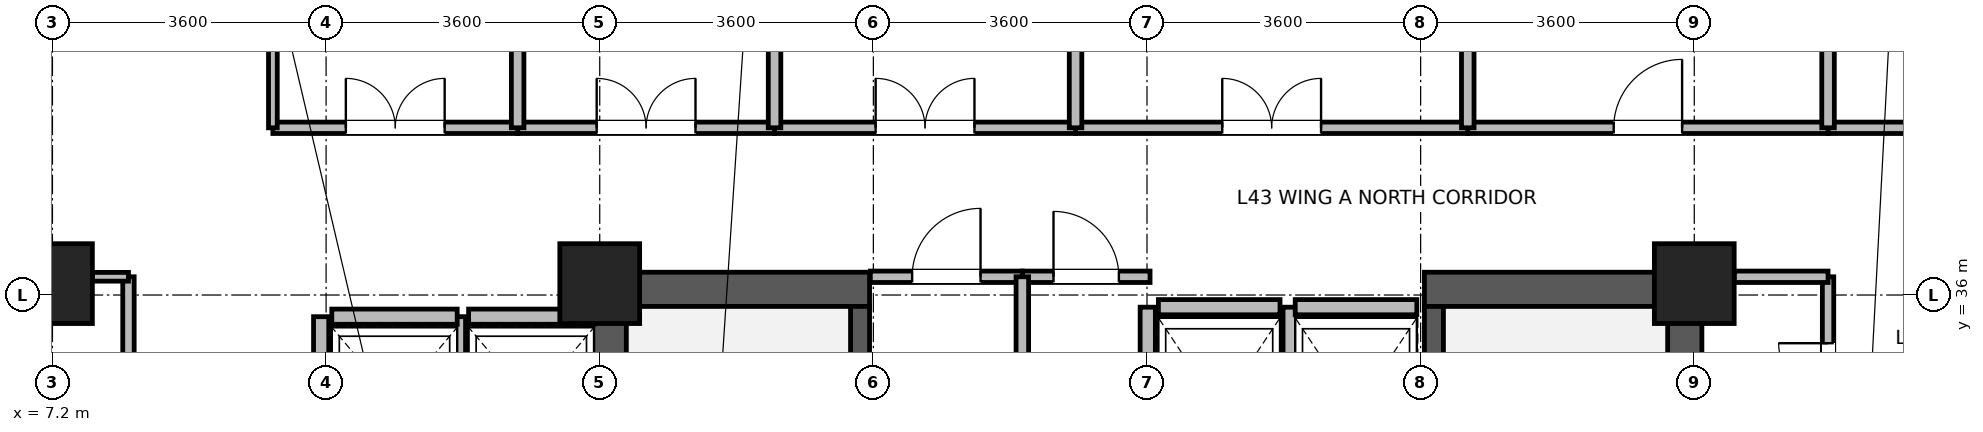
"""IFC4 building model, lengths in metres.
Left out: names, types, materials, properties, quantities, classifications, styles, units other than length and angle.
Written with IfcOpenShell. Run it as: python <this file> out.ifc"""

import sys

from ifc_helpers import new_model, si_unit, direction, frame, frame_2d, origin, origin_2d, place, context, subcontext, project, spatial, rectangle, extrude, source, transform, mapped, element, fill, save


model = new_model("IFC4")
c1 = context("Model", 3, precision=1e-05, world=origin(), true_north=direction((0.0, 1.0)))
c2 = subcontext(c1, "Body", "Model", "MODEL_VIEW")
j1 = project(units=[si_unit("LENGTHUNIT", "METRE"), si_unit("PLANEANGLEUNIT", "RADIAN")], contexts=[c1])
p1 = place(None, origin())
s1 = spatial("IfcSite", under=j1, at=p1, CompositionType="ELEMENT")
p2 = place(p1, origin())
s2 = spatial("IfcBuilding", under=s1, at=p2, CompositionType="ELEMENT")
p3 = place(p2, frame((0.0, 0.0, 169.8)))
s3 = spatial("IfcBuildingStorey", under=s2, at=p3, CompositionType="ELEMENT", Elevation=169.8)
for number, where, z_axis, x_axis in (
    (1, (14.525, 28.4, 0.0), (0.0, 0.0, 1.0), (0.0, 1.0, 0.0)),
    (2, (28.675, 28.4, 0.0), (0.0, 0.0, 1.0), (0.0, 1.0, 0.0)),
):
    element("IfcWall", number, at=place(p3, frame(where, z_axis=z_axis, x_axis=x_axis)), inside=s3, PredefinedType="SHEAR", context=c2, shape_type="SweptSolid", body=[
        extrude(rectangle(XDim=7.9, YDim=0.45, at=frame_2d((3.95, 0.0))), origin(), (0.0, 0.0, 1.0), 3.46),
    ])
for number, where, z_axis, x_axis in (
    (3, (14.75, 36.075, 0.0), (0.0, 0.0, 1.0), (1.0, 0.0, 0.0)),
    (4, (25.25, 36.075, 0.0), (0.0, 0.0, 1.0), (1.0, 0.0, 0.0)),
):
    element("IfcWall", number, at=place(p3, frame(where, z_axis=z_axis, x_axis=x_axis)), inside=s3, PredefinedType="SHEAR", context=c2, shape_type="SweptSolid", body=[
        extrude(rectangle(XDim=3.2, YDim=0.45, at=frame_2d((1.6, 0.0))), origin(), (0.0, 0.0, 1.0), 3.46),
    ])
p4 = place(p3, frame((17.825, 28.85, 0.0), z_axis=(0.0, 0.0, 1.0), x_axis=(0.0, 1.0, 0.0)))
e5 = element("IfcWall", 5, at=p4, inside=s3, PredefinedType="SHEAR", context=c2, shape_type="SweptSolid", body=[
    extrude(rectangle(XDim=7.0, YDim=0.25, at=frame_2d((3.5, 0.0))), origin(), (0.0, 0.0, 1.0), 3.46),
])
p5 = place(p4, frame((0.15, 0.0, 0.0)))
e6 = element("IfcOpeningElement", 6, at=p5, cuts=e5, PredefinedType="OPENING", context=c2, shape_type="SweptSolid", body=[
    extrude(rectangle(XDim=1.1, YDim=2.08, at=frame_2d((0.55, 1.04))), frame((0.0, 0.135, 0.0), z_axis=(0.0, -1.0, 0.0), x_axis=(1.0, 0.0, 0.0)), (0.0, 0.0, 1.0), 0.27),
])
p6 = place(p3, frame((25.375, 28.85, 0.0), z_axis=(0.0, 0.0, 1.0), x_axis=(0.0, 1.0, 0.0)))
e7 = element("IfcWall", 7, at=p6, inside=s3, PredefinedType="SHEAR", context=c2, shape_type="SweptSolid", body=[
    extrude(rectangle(XDim=7.0, YDim=0.25, at=frame_2d((3.5, 0.0))), origin(), (0.0, 0.0, 1.0), 3.46),
])
p7 = place(p6, frame((0.15, 0.0, 0.0)))
e8 = element("IfcOpeningElement", 8, at=p7, cuts=e7, PredefinedType="OPENING", context=c2, shape_type="SweptSolid", body=[
    extrude(rectangle(XDim=1.1, YDim=2.08, at=frame_2d((0.55, 1.04))), frame((0.0, 0.135, 0.0), z_axis=(0.0, -1.0, 0.0), x_axis=(1.0, 0.0, 0.0)), (0.0, 0.0, 1.0), 0.27),
])
m1 = source(origin(), c2, "Body", "SweptSolid", [
    extrude(rectangle(XDim=1.05, YDim=1.05, at=origin_2d()), origin(), (0.0, 0.0, 1.0), 3.7),
])
for number, where, z_axis, x_axis in (
    (9, (7.2, 36.15, 0.0), (0.0, 0.0, 1.0), (1.0, 0.0, 0.0)),
    (10, (14.4, 36.15, 0.0), (0.0, 0.0, 1.0), (1.0, 0.0, 0.0)),
    (11, (28.8, 36.15, 0.0), (0.0, 0.0, 1.0), (1.0, 0.0, 0.0)),
):
    element("IfcColumn", number, at=place(p3, frame(where, z_axis=z_axis, x_axis=x_axis)), inside=s3, PredefinedType="COLUMN", context=c2, shape_type="MappedRepresentation", body=[
        mapped(m1, transform((0.0, 0.0, 0.0), x_axis=(1.0, 0.0, 0.0), y_axis=(0.0, 1.0, 0.0), z_axis=(0.0, 0.0, 1.0), scale=1.0)),
    ])
p8 = place(p3, frame((12.675, 35.715, 0.0), z_axis=(0.0, 0.0, 1.0), x_axis=(1.0, 0.0, 0.0)))
e12 = element("IfcWall", 12, at=p8, inside=s3, PredefinedType="PARTITIONING", context=c2, shape_type="SweptSolid", body=[
    extrude(rectangle(XDim=1.65, YDim=0.2, at=frame_2d((0.825, 0.0))), origin(), (0.0, 0.0, 1.0), 3.44),
])
p9 = place(p3, frame((12.535, 33.485, 0.0), z_axis=(0.0, 0.0, 1.0), x_axis=(0.0, 1.0, 0.0)))
e13 = element("IfcWall", 13, at=p9, inside=s3, PredefinedType="PARTITIONING", context=c2, shape_type="SweptSolid", body=[
    extrude(rectangle(XDim=2.23, YDim=0.2, at=frame_2d((1.115, 0.0))), origin(), (0.0, 0.0, 1.0), 3.44),
])
p10 = place(p3, frame((10.875, 35.715, 0.0), z_axis=(0.0, 0.0, 1.0), x_axis=(1.0, 0.0, 0.0)))
e14 = element("IfcWall", 14, at=p10, inside=s3, PredefinedType="PARTITIONING", context=c2, shape_type="SweptSolid", body=[
    extrude(rectangle(XDim=1.65, YDim=0.2, at=frame_2d((0.825, 0.0))), origin(), (0.0, 0.0, 1.0), 3.44),
])
p11 = place(p3, frame((10.735, 33.485, 0.0), z_axis=(0.0, 0.0, 1.0), x_axis=(0.0, 1.0, 0.0)))
e15 = element("IfcWall", 15, at=p11, inside=s3, PredefinedType="PARTITIONING", context=c2, shape_type="SweptSolid", body=[
    extrude(rectangle(XDim=2.23, YDim=0.2, at=frame_2d((1.115, 0.0))), origin(), (0.0, 0.0, 1.0), 3.44),
])
p12 = place(p3, frame((21.75, 35.84, 0.0), z_axis=(0.0, 0.0, 1.0), x_axis=(1.0, 0.0, 0.0)))
e16 = element("IfcWall", 16, at=p12, inside=s3, PredefinedType="PARTITIONING", context=c2, shape_type="SweptSolid", body=[
    extrude(rectangle(XDim=1.6, YDim=0.2, at=frame_2d((0.8, 0.0))), origin(), (0.0, 0.0, 1.0), 2.44),
])
for number, where, z_axis, x_axis in (
    (17, (21.61, 33.16, 0.0), (0.0, 0.0, 1.0), (0.0, 1.0, 0.0)),
    (18, (23.49, 33.16, 0.0), (0.0, 0.0, 1.0), (0.0, 1.0, 0.0)),
):
    element("IfcWall", number, at=place(p3, frame(where, z_axis=z_axis, x_axis=x_axis)), inside=s3, PredefinedType="PARTITIONING", context=c2, shape_type="SweptSolid", body=[
        extrude(rectangle(XDim=2.68, YDim=0.2, at=frame_2d((1.34, 0.0))), origin(), (0.0, 0.0, 1.0), 3.44),
    ])
p13 = place(p3, frame((23.55, 35.84, 0.0), z_axis=(0.0, 0.0, 1.0), x_axis=(1.0, 0.0, 0.0)))
e19 = element("IfcWall", 19, at=p13, inside=s3, PredefinedType="PARTITIONING", context=c2, shape_type="SweptSolid", body=[
    extrude(rectangle(XDim=1.6, YDim=0.2, at=frame_2d((0.8, 0.0))), origin(), (0.0, 0.0, 1.0), 2.44),
])
p14 = place(p3, frame((20.66, 38.2, 0.0), z_axis=(0.0, 0.0, 1.0), x_axis=(1.0, 0.0, 0.0)))
e20 = element("IfcWall", 20, at=p14, inside=s3, PredefinedType="PARTITIONING", context=c2, shape_type="SweptSolid", body=[
    extrude(rectangle(XDim=5.16, YDim=0.15, at=frame_2d((2.58, 0.0))), origin(), (0.0, 0.0, 1.0), 3.44),
])
p15 = place(p14, frame((1.93, 0.0, 0.0)))
e21 = element("IfcOpeningElement", 21, at=p15, cuts=e20, PredefinedType="OPENING", context=c2, shape_type="SweptSolid", body=[
    extrude(rectangle(XDim=1.3, YDim=2.12, at=frame_2d((0.65, 1.06))), frame((0.0, 0.085, 0.0), z_axis=(0.0, -1.0, 0.0), x_axis=(1.0, 0.0, 0.0)), (0.0, 0.0, 1.0), 0.17),
])
p16 = place(p3, frame((30.56, 38.2, 0.0), z_axis=(0.0, 0.0, 1.0), x_axis=(1.0, 0.0, 0.0)))
e22 = element("IfcWall", 22, at=p16, inside=s3, PredefinedType="PARTITIONING", context=c2, shape_type="SweptSolid", body=[
    extrude(rectangle(XDim=4.8, YDim=0.15, at=frame_2d((2.4, 0.0))), origin(), (0.0, 0.0, 1.0), 3.44),
])
p17 = place(p16, frame((1.75, 0.0, 0.0)))
e23 = element("IfcOpeningElement", 23, at=p17, cuts=e22, PredefinedType="OPENING", context=c2, shape_type="SweptSolid", body=[
    extrude(rectangle(XDim=1.3, YDim=2.12, at=frame_2d((0.65, 1.06))), frame((0.0, 0.085, 0.0), z_axis=(0.0, -1.0, 0.0), x_axis=(1.0, 0.0, 0.0)), (0.0, 0.0, 1.0), 0.17),
])
p18 = place(p3, frame((25.82, 38.2, 0.0), z_axis=(0.0, 0.0, 1.0), x_axis=(1.0, 0.0, 0.0)))
e24 = element("IfcWall", 24, at=p18, inside=s3, PredefinedType="PARTITIONING", context=c2, shape_type="SweptSolid", body=[
    extrude(rectangle(XDim=4.74, YDim=0.15, at=frame_2d((2.37, 0.0))), origin(), (0.0, 0.0, 1.0), 3.44),
])
p19 = place(p18, frame((1.92, 0.0, 0.0)))
e25 = element("IfcOpeningElement", 25, at=p19, cuts=e24, PredefinedType="OPENING", context=c2, shape_type="SweptSolid", body=[
    extrude(rectangle(XDim=0.9, YDim=2.08, at=frame_2d((0.45, 1.04))), frame((0.0, 0.085, 0.0), z_axis=(0.0, -1.0, 0.0), x_axis=(1.0, 0.0, 0.0)), (0.0, 0.0, 1.0), 0.17),
])
p20 = place(p3, frame((16.7, 38.2, 0.0), z_axis=(0.0, 0.0, 1.0), x_axis=(1.0, 0.0, 0.0)))
e26 = element("IfcWall", 26, at=p20, inside=s3, PredefinedType="PARTITIONING", context=c2, shape_type="SweptSolid", body=[
    extrude(rectangle(XDim=3.96, YDim=0.15, at=frame_2d((1.98, 0.0))), origin(), (0.0, 0.0, 1.0), 3.44),
])
p21 = place(p20, frame((1.33, 0.0, 0.0)))
e27 = element("IfcOpeningElement", 27, at=p21, cuts=e26, PredefinedType="OPENING", context=c2, shape_type="SweptSolid", body=[
    extrude(rectangle(XDim=1.3, YDim=2.12, at=frame_2d((0.65, 1.06))), frame((0.0, 0.085, 0.0), z_axis=(0.0, -1.0, 0.0), x_axis=(1.0, 0.0, 0.0)), (0.0, 0.0, 1.0), 0.17),
])
p22 = place(p3, frame((8.2, 32.4, 0.0), z_axis=(0.0, 0.0, 1.0), x_axis=(0.0, 1.0, 0.0)))
e28 = element("IfcWall", 28, at=p22, inside=s3, PredefinedType="PARTITIONING", context=c2, shape_type="SweptSolid", body=[
    extrude(rectangle(XDim=3.84, YDim=0.15, at=frame_2d((1.92, 0.0))), origin(), (0.0, 0.0, 1.0), 3.44),
])
p23 = place(p22, frame((1.27, 0.0, 0.0)))
e29 = element("IfcOpeningElement", 29, at=p23, cuts=e28, PredefinedType="OPENING", context=c2, shape_type="SweptSolid", body=[
    extrude(rectangle(XDim=1.3, YDim=2.12, at=frame_2d((0.65, 1.06))), frame((0.0, 0.085, 0.0), z_axis=(0.0, -1.0, 0.0), x_axis=(1.0, 0.0, 0.0)), (0.0, 0.0, 1.0), 0.17),
])
p24 = place(p3, frame((13.32, 38.2, 0.0), z_axis=(0.0, 0.0, 1.0), x_axis=(1.0, 0.0, 0.0)))
e30 = element("IfcWall", 30, at=p24, inside=s3, PredefinedType="PARTITIONING", context=c2, shape_type="SweptSolid", body=[
    extrude(rectangle(XDim=3.38, YDim=0.15, at=frame_2d((1.69, 0.0))), origin(), (0.0, 0.0, 1.0), 3.44),
])
p25 = place(p24, frame((1.04, 0.0, 0.0)))
e31 = element("IfcOpeningElement", 31, at=p25, cuts=e30, PredefinedType="OPENING", context=c2, shape_type="SweptSolid", body=[
    extrude(rectangle(XDim=1.3, YDim=2.12, at=frame_2d((0.65, 1.06))), frame((0.0, 0.085, 0.0), z_axis=(0.0, -1.0, 0.0), x_axis=(1.0, 0.0, 0.0)), (0.0, 0.0, 1.0), 0.17),
])
p26 = place(p3, frame((10.1, 38.2, 0.0), z_axis=(0.0, 0.0, 1.0), x_axis=(1.0, 0.0, 0.0)))
e32 = element("IfcWall", 32, at=p26, inside=s3, PredefinedType="PARTITIONING", context=c2, shape_type="SweptSolid", body=[
    extrude(rectangle(XDim=3.22, YDim=0.15, at=frame_2d((1.61, 0.0))), origin(), (0.0, 0.0, 1.0), 3.44),
])
p27 = place(p26, frame((0.96, 0.0, 0.0)))
e33 = element("IfcOpeningElement", 33, at=p27, cuts=e32, PredefinedType="OPENING", context=c2, shape_type="SweptSolid", body=[
    extrude(rectangle(XDim=1.3, YDim=2.12, at=frame_2d((0.65, 1.06))), frame((0.0, 0.085, 0.0), z_axis=(0.0, -1.0, 0.0), x_axis=(1.0, 0.0, 0.0)), (0.0, 0.0, 1.0), 0.17),
])
p28 = place(p3, frame((30.56, 33.7, 0.0), z_axis=(0.0, 0.0, 1.0), x_axis=(0.0, 1.0, 0.0)))
e34 = element("IfcWall", 34, at=p28, inside=s3, PredefinedType="PARTITIONING", context=c2, shape_type="SweptSolid", body=[
    extrude(rectangle(XDim=2.54, YDim=0.15, at=frame_2d((1.27, 0.0))), origin(), (0.0, 0.0, 1.0), 3.44),
])
p29 = place(p28, frame((0.366, 0.0, 0.0)))
e35 = element("IfcOpeningElement", 35, at=p29, cuts=e34, PredefinedType="OPENING", context=c2, shape_type="SweptSolid", body=[
    extrude(rectangle(XDim=1.3, YDim=2.12, at=frame_2d((0.65, 1.06))), frame((0.0, 0.085, 0.0), z_axis=(0.0, -1.0, 0.0), x_axis=(1.0, 0.0, 0.0)), (0.0, 0.0, 1.0), 0.17),
])
p30 = place(p3, frame((17.96, 36.24, 0.0), z_axis=(0.0, 0.0, 1.0), x_axis=(1.0, 0.0, 0.0)))
e36 = element("IfcWall", 36, at=p30, inside=s3, PredefinedType="PARTITIONING", context=c2, shape_type="SweptSolid", body=[
    extrude(rectangle(XDim=2.0, YDim=0.15, at=frame_2d((1.0, 0.0))), origin(), (0.0, 0.0, 1.0), 2.44),
])
p31 = place(p30, frame((0.55, 0.0, 0.0)))
e37 = element("IfcOpeningElement", 37, at=p31, cuts=e36, PredefinedType="OPENING", context=c2, shape_type="SweptSolid", body=[
    extrude(rectangle(XDim=0.9, YDim=2.08, at=frame_2d((0.45, 1.04))), frame((0.0, 0.085, 0.0), z_axis=(0.0, -1.0, 0.0), x_axis=(1.0, 0.0, 0.0)), (0.0, 0.0, 1.0), 0.17),
])
p32 = place(p3, frame((29.325, 36.24, 0.0), z_axis=(0.0, 0.0, 1.0), x_axis=(1.0, 0.0, 0.0)))
e38 = element("IfcWall", 38, at=p32, inside=s3, PredefinedType="PARTITIONING", context=c2, shape_type="SweptSolid", body=[
    extrude(rectangle(XDim=1.235, YDim=0.15, at=frame_2d((0.618, 0.0))), origin(), (0.0, 0.0, 1.0), 2.84),
])
p33 = place(p3, frame((19.96, 36.24, 0.0), z_axis=(0.0, 0.0, 1.0), x_axis=(1.0, 0.0, 0.0)))
e39 = element("IfcWall", 39, at=p33, inside=s3, PredefinedType="PARTITIONING", context=c2, shape_type="SweptSolid", body=[
    extrude(rectangle(XDim=1.68, YDim=0.15, at=frame_2d((0.84, 0.0))), origin(), (0.0, 0.0, 1.0), 2.44),
])
p34 = place(p33, frame((0.41, 0.0, 0.0)))
e40 = element("IfcOpeningElement", 40, at=p34, cuts=e39, PredefinedType="OPENING", context=c2, shape_type="SweptSolid", body=[
    extrude(rectangle(XDim=0.86, YDim=2.02, at=frame_2d((0.43, 1.01))), frame((0.0, 0.085, 0.0), z_axis=(0.0, -1.0, 0.0), x_axis=(1.0, 0.0, 0.0)), (0.0, 0.0, 1.0), 0.17),
])
p35 = place(p3, frame((7.725, 36.24, 0.0), z_axis=(0.0, 0.0, 1.0), x_axis=(1.0, 0.0, 0.0)))
e41 = element("IfcWall", 41, at=p35, inside=s3, PredefinedType="PARTITIONING", context=c2, shape_type="SweptSolid", body=[
    extrude(rectangle(XDim=0.475, YDim=0.115, at=frame_2d((0.237, 0.0))), origin(), (0.0, 0.0, 1.0), 2.84),
])
p36 = place(p3, frame((10.1, 38.2, 0.0), z_axis=(0.0, 0.0, 1.0), x_axis=(0.0, 1.0, 0.0)))
e42 = element("IfcWall", 42, at=p36, inside=s3, PredefinedType="PARTITIONING", context=c2, shape_type="SweptSolid", body=[
    extrude(rectangle(XDim=1.268, YDim=0.115, at=frame_2d((0.634, 0.0))), origin(), (0.0, 0.0, 1.0), 3.44),
])
for number, where, z_axis, x_axis in (
    (43, (13.32, 38.2, 0.0), (0.0, 0.0, 1.0), (0.0, 1.0, 0.0)),
    (44, (16.7, 38.2, 0.0), (0.0, 0.0, 1.0), (0.0, 1.0, 0.0)),
    (45, (20.66, 38.2, 0.0), (0.0, 0.0, 1.0), (0.0, 1.0, 0.0)),
    (46, (25.82, 38.2, 0.0), (0.0, 0.0, 1.0), (0.0, 1.0, 0.0)),
    (47, (30.56, 38.2, 0.0), (0.0, 0.0, 1.0), (0.0, 1.0, 0.0)),
):
    element("IfcWall", number, at=place(p3, frame(where, z_axis=z_axis, x_axis=x_axis)), inside=s3, PredefinedType="PARTITIONING", context=c2, shape_type="SweptSolid", body=[
        extrude(rectangle(XDim=4.868, YDim=0.165, at=frame_2d((2.434, 0.0))), origin(), (0.0, 0.0, 1.0), 3.44),
    ])
p37 = place(p3, frame((19.96, 33.36, 0.0), z_axis=(0.0, 0.0, 1.0), x_axis=(0.0, 1.0, 0.0)))
e48 = element("IfcWall", 48, at=p37, inside=s3, PredefinedType="PARTITIONING", context=c2, shape_type="SweptSolid", body=[
    extrude(rectangle(XDim=2.88, YDim=0.165, at=frame_2d((1.44, 0.0))), origin(), (0.0, 0.0, 1.0), 3.44),
])
p38 = place(p15, origin())
e49 = element("IfcDoor", 49, at=p38, inside=s3, OperationType="DOUBLE_DOOR_SINGLE_SWING", PredefinedType="DOOR", context=c2, shape_type="SweptSolid", body=[
    extrude(rectangle(XDim=1.3, YDim=2.12, at=frame_2d((0.65, 1.06))), frame((0.0, 0.025, 0.0), z_axis=(0.0, -1.0, 0.0), x_axis=(1.0, 0.0, 0.0)), (0.0, 0.0, 1.0), 0.05),
])
fill(e21, e49)
p39 = place(p19, origin())
e50 = element("IfcDoor", 50, at=p39, inside=s3, OperationType="SINGLE_SWING_RIGHT", PredefinedType="DOOR", context=c2, shape_type="SweptSolid", body=[
    extrude(rectangle(XDim=0.9, YDim=2.08, at=frame_2d((0.45, 1.04))), frame((0.0, 0.025, 0.0), z_axis=(0.0, -1.0, 0.0), x_axis=(1.0, 0.0, 0.0)), (0.0, 0.0, 1.0), 0.05),
])
fill(e25, e50)
p40 = place(p21, origin())
e51 = element("IfcDoor", 51, at=p40, inside=s3, OperationType="DOUBLE_DOOR_SINGLE_SWING", PredefinedType="DOOR", context=c2, shape_type="SweptSolid", body=[
    extrude(rectangle(XDim=1.3, YDim=2.12, at=frame_2d((0.65, 1.06))), frame((0.0, 0.025, 0.0), z_axis=(0.0, -1.0, 0.0), x_axis=(1.0, 0.0, 0.0)), (0.0, 0.0, 1.0), 0.05),
])
fill(e27, e51)
p41 = place(p25, origin())
e52 = element("IfcDoor", 52, at=p41, inside=s3, OperationType="DOUBLE_DOOR_SINGLE_SWING", PredefinedType="DOOR", context=c2, shape_type="SweptSolid", body=[
    extrude(rectangle(XDim=1.3, YDim=2.12, at=frame_2d((0.65, 1.06))), frame((0.0, 0.025, 0.0), z_axis=(0.0, -1.0, 0.0), x_axis=(1.0, 0.0, 0.0)), (0.0, 0.0, 1.0), 0.05),
])
fill(e31, e52)
p42 = place(p27, origin())
e53 = element("IfcDoor", 53, at=p42, inside=s3, OperationType="DOUBLE_DOOR_SINGLE_SWING", PredefinedType="DOOR", context=c2, shape_type="SweptSolid", body=[
    extrude(rectangle(XDim=1.3, YDim=2.12, at=frame_2d((0.65, 1.06))), frame((0.0, 0.025, 0.0), z_axis=(0.0, -1.0, 0.0), x_axis=(1.0, 0.0, 0.0)), (0.0, 0.0, 1.0), 0.05),
])
fill(e33, e53)
p43 = place(p29, origin())
e54 = element("IfcDoor", 54, at=p43, inside=s3, OperationType="DOUBLE_DOOR_SINGLE_SWING", PredefinedType="DOOR", context=c2, shape_type="SweptSolid", body=[
    extrude(rectangle(XDim=1.3, YDim=2.12, at=frame_2d((0.65, 1.06))), frame((0.0, 0.025, 0.0), z_axis=(0.0, -1.0, 0.0), x_axis=(1.0, 0.0, 0.0)), (0.0, 0.0, 1.0), 0.05),
])
fill(e35, e54)
p44 = place(p31, origin())
e55 = element("IfcDoor", 55, at=p44, inside=s3, OperationType="SINGLE_SWING_RIGHT", PredefinedType="DOOR", context=c2, shape_type="SweptSolid", body=[
    extrude(rectangle(XDim=0.9, YDim=2.08, at=frame_2d((0.45, 1.04))), frame((0.0, 0.025, 0.0), z_axis=(0.0, -1.0, 0.0), x_axis=(1.0, 0.0, 0.0)), (0.0, 0.0, 1.0), 0.05),
])
fill(e37, e55)
p45 = place(p34, origin())
e56 = element("IfcDoor", 56, at=p45, inside=s3, OperationType="SINGLE_SWING_LEFT", PredefinedType="DOOR", context=c2, shape_type="SweptSolid", body=[
    extrude(rectangle(XDim=0.86, YDim=2.02, at=frame_2d((0.43, 1.01))), frame((0.0, 0.025, 0.0), z_axis=(0.0, -1.0, 0.0), x_axis=(1.0, 0.0, 0.0)), (0.0, 0.0, 1.0), 0.05),
])
fill(e40, e56)
save(model, sys.argv[1])
